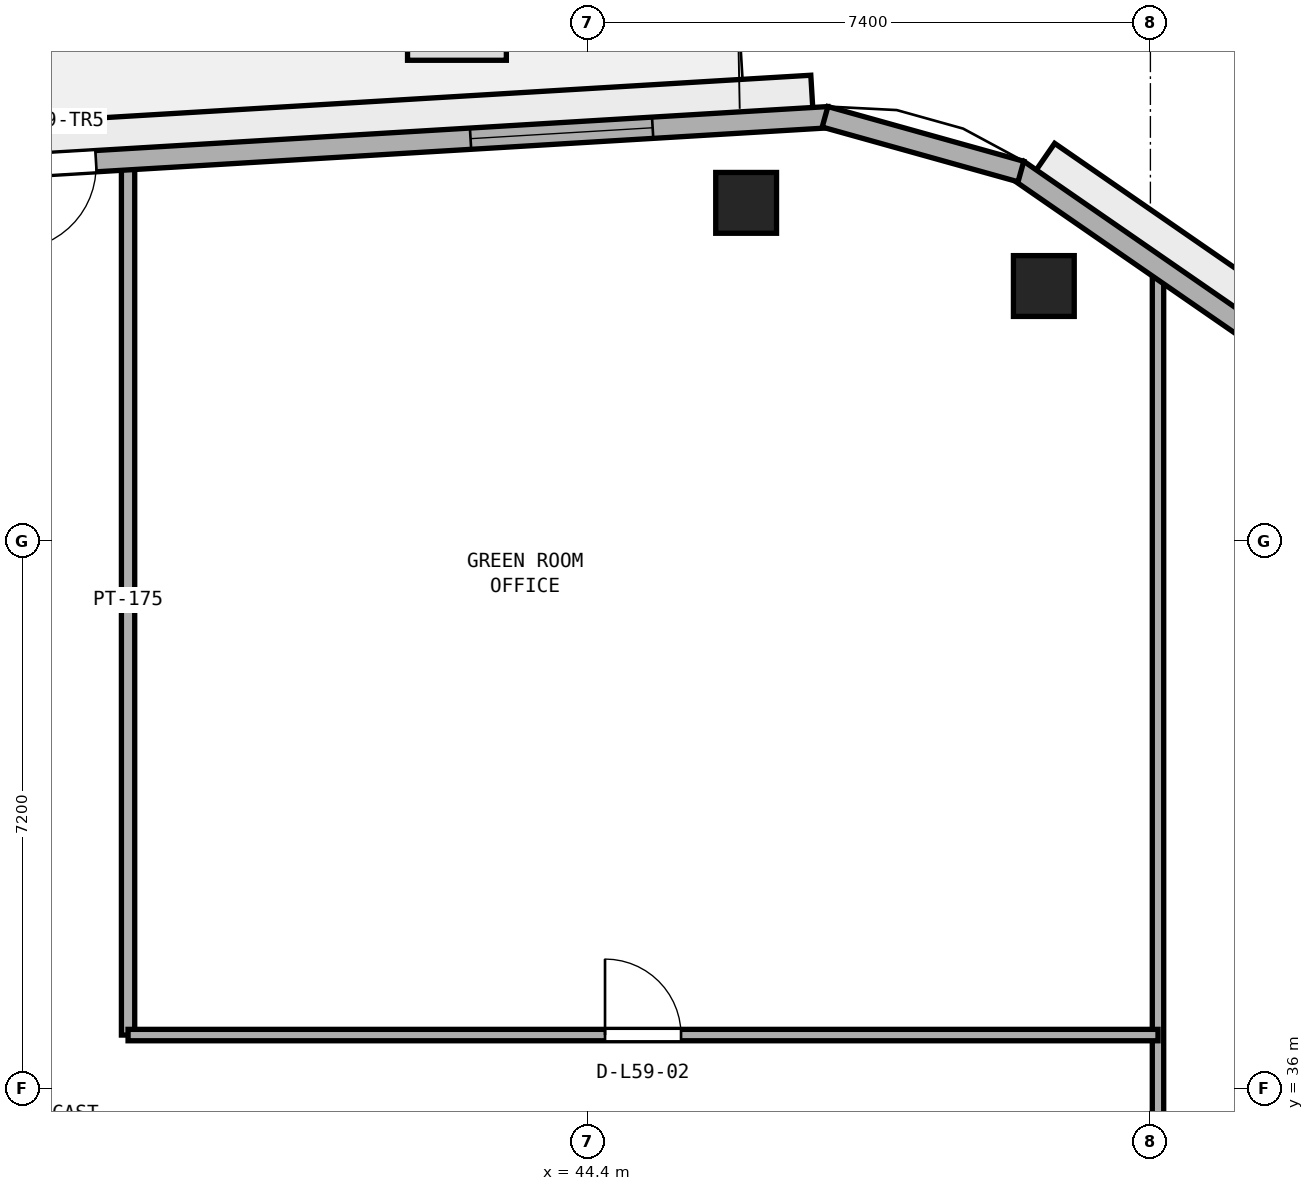
"""IFC4 building model, lengths in metres.
Left out: names, types, materials, properties, quantities, classifications, styles, units other than length and angle.
Written with IfcOpenShell. Run it as: python <this file> out.ifc"""

import sys

from ifc_helpers import new_model, si_unit, direction, frame, frame_2d, origin, origin_2d, place, context, subcontext, project, spatial, rectangle, extrude, element, fill, save


model = new_model("IFC4")
c1 = context("Model", 3, precision=1e-05, world=origin(), true_north=direction((0.0, 1.0)))
c2 = subcontext(c1, "Body", "Model", "MODEL_VIEW")
j1 = project(units=[si_unit("LENGTHUNIT", "METRE"), si_unit("PLANEANGLEUNIT", "RADIAN")], contexts=[c1])
p1 = place(None, origin())
s1 = spatial("IfcSite", under=j1, at=p1, CompositionType="ELEMENT")
p2 = place(p1, origin())
s2 = spatial("IfcBuilding", under=s1, at=p2, CompositionType="ELEMENT")
p3 = place(p2, frame((0.0, 0.0, 232.6)))
s3 = spatial("IfcBuildingStorey", under=s2, at=p3, CompositionType="ELEMENT", Elevation=232.6)
for number, where, z_axis, x_axis in (
    (1, (50.398, 46.554, 0.0), (0.0, 0.0, 1.0), (1.0, 0.0, 0.0)),
    (2, (46.481, 47.648, 0.0), (0.0, 0.0, 1.0), (1.0, 0.0, 0.0)),
):
    element("IfcColumn", number, at=place(p3, frame(where, z_axis=z_axis, x_axis=x_axis)), inside=s3, PredefinedType="COLUMN", context=c2, shape_type="SweptSolid", body=[
        extrude(rectangle(XDim=0.8, YDim=0.8, at=origin_2d()), origin(), (0.0, 0.0, 1.0), 3.8),
    ])
p4 = place(p3, frame((51.9, 22.6, 0.0), z_axis=(0.0, 0.0, 1.0), x_axis=(0.0, 1.0, 0.0)))
e3 = element("IfcWall", 3, at=p4, inside=s3, PredefinedType="PARTITIONING", context=c2, shape_type="SweptSolid", body=[
    extrude(rectangle(XDim=24.235, YDim=0.15, at=frame_2d((12.117, 0.0))), origin(), (0.0, 0.0, 1.0), 3.51),
])
p5 = place(p4, frame((2.92, 0.0, 0.0)))
e4 = element("IfcOpeningElement", 4, at=p5, cuts=e3, PredefinedType="OPENING", context=c2, shape_type="SweptSolid", body=[
    extrude(rectangle(XDim=1.0, YDim=2.12, at=frame_2d((0.5, 1.06))), frame((0.0, 0.085, 0.0), z_axis=(0.0, -1.0, 0.0), x_axis=(1.0, 0.0, 0.0)), (0.0, 0.0, 1.0), 0.17),
])
p6 = place(p4, frame((9.85, 0.0, 0.0)))
e5 = element("IfcOpeningElement", 5, at=p6, cuts=e3, PredefinedType="OPENING", context=c2, shape_type="SweptSolid", body=[
    extrude(rectangle(XDim=1.0, YDim=2.12, at=frame_2d((0.5, 1.06))), frame((0.0, 0.085, 0.0), z_axis=(0.0, -1.0, 0.0), x_axis=(1.0, 0.0, 0.0)), (0.0, 0.0, 1.0), 0.17),
])
p7 = place(p3, frame((38.35, 36.7, 0.0), z_axis=(0.0, 0.0, 1.0), x_axis=(0.0, 1.0, 0.0)))
e6 = element("IfcWall", 6, at=p7, inside=s3, PredefinedType="PARTITIONING", context=c2, shape_type="SweptSolid", body=[
    extrude(rectangle(XDim=11.458, YDim=0.175, at=frame_2d((5.729, 0.0))), origin(), (0.0, 0.0, 1.0), 3.51),
])
p8 = place(p3, frame((38.35, 36.7, 0.0), z_axis=(0.0, 0.0, 1.0), x_axis=(1.0, 0.0, 0.0)))
e7 = element("IfcWall", 7, at=p8, inside=s3, PredefinedType="PARTITIONING", context=c2, shape_type="SweptSolid", body=[
    extrude(rectangle(XDim=13.55, YDim=0.15, at=frame_2d((6.775, 0.0))), origin(), (0.0, 0.0, 1.0), 3.51),
])
p9 = place(p8, frame((6.275, 0.0, 0.0)))
e8 = element("IfcOpeningElement", 8, at=p9, cuts=e7, PredefinedType="OPENING", context=c2, shape_type="SweptSolid", body=[
    extrude(rectangle(XDim=1.0, YDim=2.12, at=frame_2d((0.5, 1.06))), frame((0.0, 0.085, 0.0), z_axis=(0.0, -1.0, 0.0), x_axis=(1.0, 0.0, 0.0)), (0.0, 0.0, 1.0), 0.17),
])
p10 = place(p3, frame((63.651, 38.683, 0.0), z_axis=(0.0, 0.0, 1.0), x_axis=(-0.822655095, 0.568540759022, 0.0)))
e9 = element("IfcWall", 9, at=p10, inside=s3, PredefinedType="STANDARD", context=c2, shape_type="SweptSolid", body=[
    extrude(rectangle(XDim=16.528, YDim=0.28, at=frame_2d((8.264, 0.0))), origin(), (0.0, 0.0, 1.0), 3.51),
])
p11 = place(p10, frame((1.888, 0.0, 0.9)))
e10 = element("IfcOpeningElement", 10, at=p11, cuts=e9, PredefinedType="OPENING", context=c2, shape_type="SweptSolid", body=[
    extrude(rectangle(XDim=2.4, YDim=1.75, at=frame_2d((1.2, 0.875))), frame((0.0, 0.15, 0.0), z_axis=(0.0, -1.0, 0.0), x_axis=(1.0, 0.0, 0.0)), (0.0, 0.0, 1.0), 0.3),
])
p12 = place(p10, frame((7.064, 0.0, 0.9)))
e11 = element("IfcOpeningElement", 11, at=p12, cuts=e9, PredefinedType="OPENING", context=c2, shape_type="SweptSolid", body=[
    extrude(rectangle(XDim=2.4, YDim=1.75, at=frame_2d((1.2, 0.875))), frame((0.0, 0.15, 0.0), z_axis=(0.0, -1.0, 0.0), x_axis=(1.0, 0.0, 0.0)), (0.0, 0.0, 1.0), 0.3),
])
p13 = place(p3, frame((47.566, 48.775, 0.0), z_axis=(0.0, 0.0, 1.0), x_axis=(-0.998202767485, -0.059926913695, 0.0)))
e12 = element("IfcWall", 12, at=p13, inside=s3, PredefinedType="STANDARD", context=c2, shape_type="SweptSolid", body=[
    extrude(rectangle(XDim=19.111, YDim=0.28, at=frame_2d((9.556, 0.0))), origin(), (0.0, 0.0, 1.0), 3.51),
])
p14 = place(p13, frame((9.656, 0.0, 0.0)))
e13 = element("IfcOpeningElement", 13, at=p14, cuts=e12, PredefinedType="OPENING", context=c2, shape_type="SweptSolid", body=[
    extrude(rectangle(XDim=1.1, YDim=2.2, at=frame_2d((0.55, 1.1))), frame((0.0, 0.15, 0.0), z_axis=(0.0, -1.0, 0.0), x_axis=(1.0, 0.0, 0.0)), (0.0, 0.0, 1.0), 0.3),
])
p15 = place(p13, frame((2.319, 0.0, 0.9)))
e14 = element("IfcOpeningElement", 14, at=p15, cuts=e12, PredefinedType="OPENING", context=c2, shape_type="SweptSolid", body=[
    extrude(rectangle(XDim=2.4, YDim=1.75, at=frame_2d((1.2, 0.875))), frame((0.0, 0.15, 0.0), z_axis=(0.0, -1.0, 0.0), x_axis=(1.0, 0.0, 0.0)), (0.0, 0.0, 1.0), 0.3),
])
p16 = place(p13, frame((14.392, 0.0, 0.9)))
e15 = element("IfcOpeningElement", 15, at=p16, cuts=e12, PredefinedType="OPENING", context=c2, shape_type="SweptSolid", body=[
    extrude(rectangle(XDim=2.4, YDim=1.75, at=frame_2d((1.2, 0.875))), frame((0.0, 0.15, 0.0), z_axis=(0.0, -1.0, 0.0), x_axis=(1.0, 0.0, 0.0)), (0.0, 0.0, 1.0), 0.3),
])
p17 = place(p3, frame((50.096, 48.061, 0.0), z_axis=(0.0, 0.0, 1.0), x_axis=(-0.963108887091, 0.269112005688, 0.0)))
e16 = element("IfcWall", 16, at=p17, inside=s3, PredefinedType="STANDARD", context=c2, shape_type="SweptSolid", body=[
    extrude(rectangle(XDim=2.675, YDim=0.28, at=frame_2d((1.338, 0.0))), origin(), (0.0, 0.0, 1.0), 3.51),
])
p18 = place(p9, origin())
e17 = element("IfcDoor", 17, at=p18, inside=s3, OperationType="SINGLE_SWING_LEFT", PredefinedType="DOOR", context=c2, shape_type="SweptSolid", body=[
    extrude(rectangle(XDim=1.0, YDim=2.12, at=frame_2d((0.5, 1.06))), frame((0.0, 0.025, 0.0), z_axis=(0.0, -1.0, 0.0), x_axis=(1.0, 0.0, 0.0)), (0.0, 0.0, 1.0), 0.05),
])
fill(e8, e17)
p19 = place(p14, origin())
e18 = element("IfcDoor", 18, at=p19, inside=s3, OperationType="SINGLE_SWING_RIGHT", PredefinedType="DOOR", context=c2, shape_type="SweptSolid", body=[
    extrude(rectangle(XDim=1.1, YDim=2.2, at=frame_2d((0.55, 1.1))), frame((0.0, 0.025, 0.0), z_axis=(0.0, -1.0, 0.0), x_axis=(1.0, 0.0, 0.0)), (0.0, 0.0, 1.0), 0.05),
])
fill(e13, e18)
p20 = place(p15, origin())
e19 = element("IfcWindow", 19, at=p20, inside=s3, PartitioningType="SINGLE_PANEL", PredefinedType="WINDOW", context=c2, shape_type="SweptSolid", body=[
    extrude(rectangle(XDim=2.4, YDim=1.75, at=frame_2d((1.2, 0.875))), frame((0.0, 0.03, 0.0), z_axis=(0.0, -1.0, 0.0), x_axis=(1.0, 0.0, 0.0)), (0.0, 0.0, 1.0), 0.06),
])
fill(e14, e19)
save(model, sys.argv[1])
